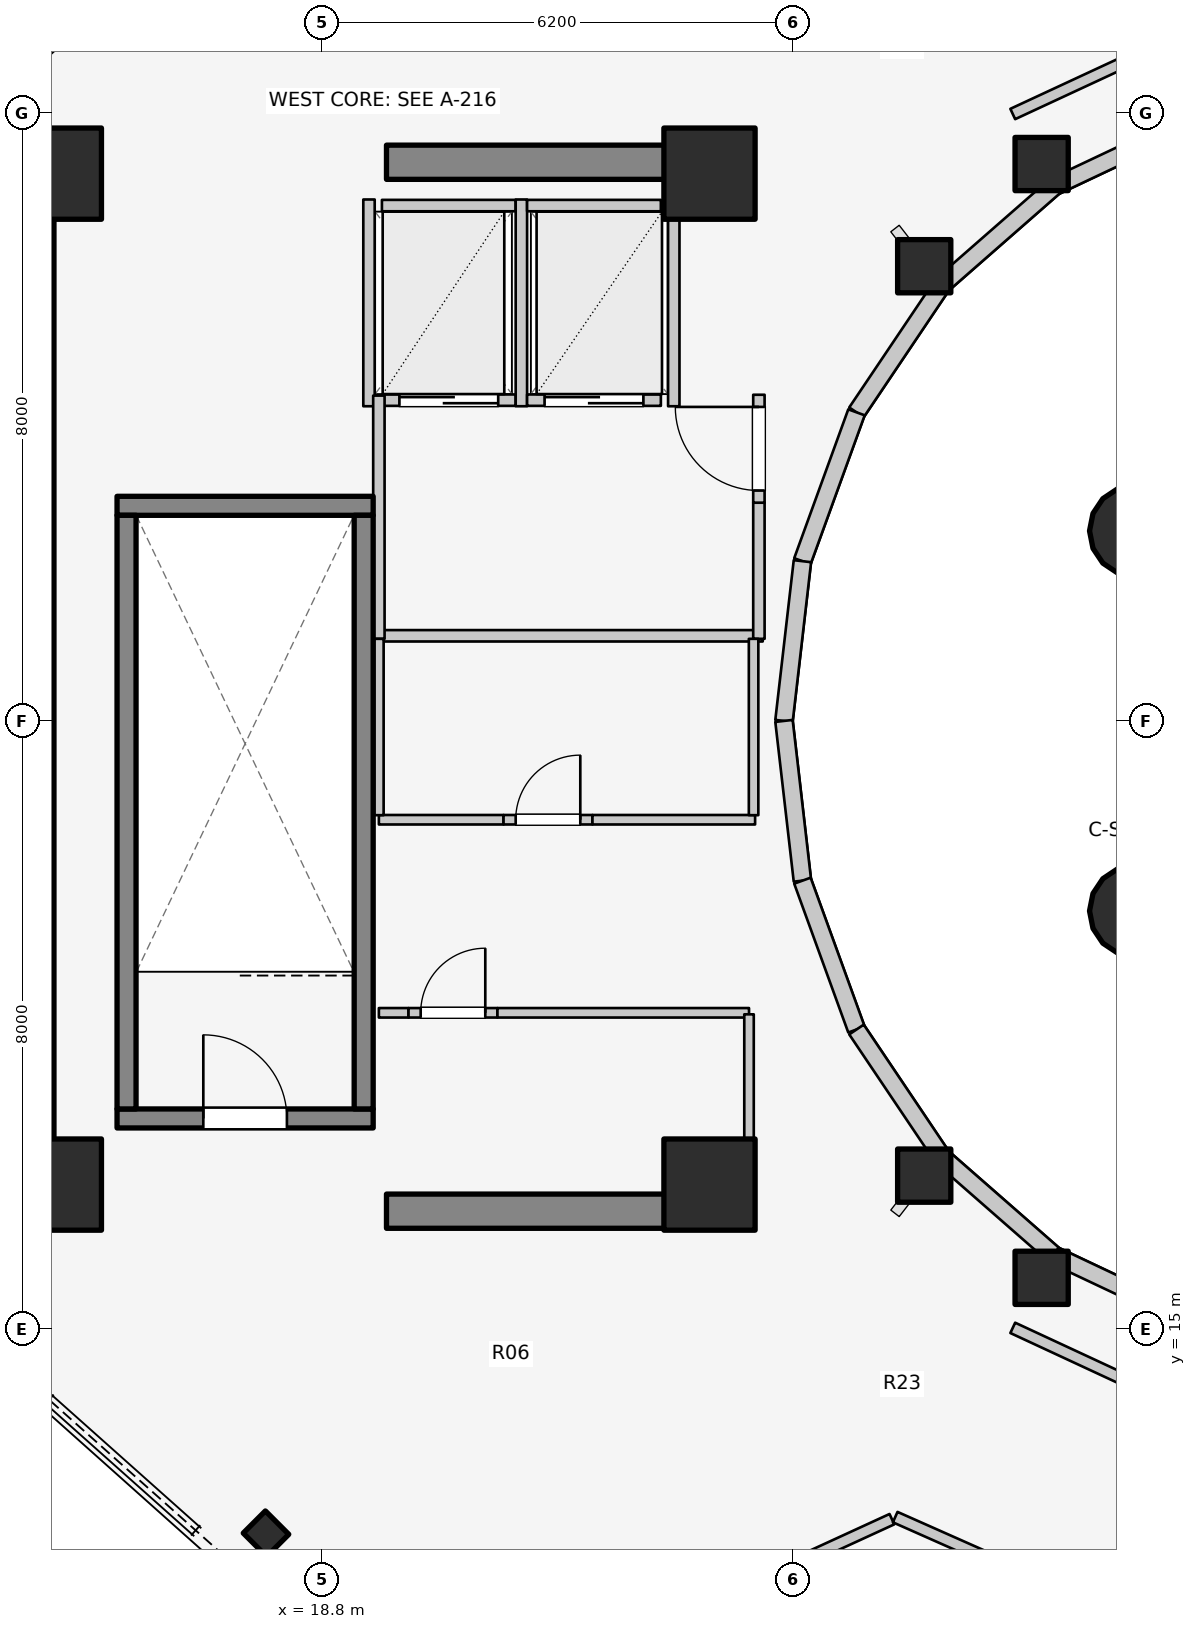
"""IFC4 building model, lengths in metres.
Left out: names, types, materials, properties, quantities, classifications, styles, units other than length and angle.
Written with IfcOpenShell. Run it as: python <this file> out.ifc"""

import sys

from ifc_helpers import new_model, si_unit, direction, frame, frame_2d, origin, origin_2d, place, context, subcontext, project, spatial, rectangle, hollow_circle, i_section, extrude, element, fill, save


model = new_model("IFC4")
c1 = context("Model", 3, precision=1e-05, world=origin(), true_north=direction((0.0, 1.0)))
c2 = subcontext(c1, "Body", "Model", "MODEL_VIEW")
j1 = project(units=[si_unit("LENGTHUNIT", "METRE"), si_unit("PLANEANGLEUNIT", "RADIAN")], contexts=[c1])
p1 = place(None, origin())
s1 = spatial("IfcSite", under=j1, at=p1, CompositionType="ELEMENT")
p2 = place(p1, origin())
s2 = spatial("IfcBuilding", under=s1, at=p2, CompositionType="ELEMENT")
p3 = place(p2, frame((0.0, 0.0, 276.4)))
s3 = spatial("IfcBuildingStorey", under=s2, at=p3, CompositionType="ELEMENT", Elevation=276.4)
p4 = place(p3, frame((15.05, 17.05, 0.0), z_axis=(0.0, 0.0, 1.0), x_axis=(0.0, 1.0, 0.0)))
e1 = element("IfcWall", 1, at=p4, inside=s3, PredefinedType="SHEAR", context=c2, shape_type="SweptSolid", body=[
    extrude(rectangle(XDim=12.8, YDim=0.45, at=frame_2d((6.4, 0.0))), origin(), (0.0, 0.0, 1.0), 3.2),
])
for number, where, z_axis, x_axis in (
    (2, (19.65, 16.55, 0.0), (0.0, 0.0, 1.0), (1.0, 0.0, 0.0)),
    (3, (19.65, 30.35, 0.0), (0.0, 0.0, 1.0), (1.0, 0.0, 0.0)),
):
    element("IfcWall", number, at=place(p3, frame(where, z_axis=z_axis, x_axis=x_axis)), inside=s3, PredefinedType="SHEAR", context=c2, shape_type="SweptSolid", body=[
        extrude(rectangle(XDim=4.5, YDim=0.45, at=frame_2d((2.25, 0.0))), origin(), (0.0, 0.0, 1.0), 3.2),
    ])
p5 = place(p3, frame((16.105, 17.77, 0.0), z_axis=(0.0, 0.0, 1.0), x_axis=(1.0, 0.0, 0.0)))
e4 = element("IfcWall", 4, at=p5, inside=s3, PredefinedType="SOLIDWALL", context=c2, shape_type="SweptSolid", body=[
    extrude(rectangle(XDim=3.37, YDim=0.25, at=frame_2d((1.685, 0.0))), origin(), (0.0, 0.0, 1.0), 3.2),
])
p6 = place(p5, frame((1.135, 0.0, 0.0)))
e5 = element("IfcOpeningElement", 5, at=p6, cuts=e4, PredefinedType="OPENING", context=c2, shape_type="SweptSolid", body=[
    extrude(rectangle(XDim=1.1, YDim=2.1, at=frame_2d((0.55, 1.05))), frame((0.0, 0.135, 0.0), z_axis=(0.0, -1.0, 0.0), x_axis=(1.0, 0.0, 0.0)), (0.0, 0.0, 1.0), 0.27),
])
p7 = place(p3, frame((16.105, 25.83, 0.0), z_axis=(0.0, 0.0, 1.0), x_axis=(1.0, 0.0, 0.0)))
e6 = element("IfcWall", 6, at=p7, inside=s3, PredefinedType="SOLIDWALL", context=c2, shape_type="SweptSolid", body=[
    extrude(rectangle(XDim=3.37, YDim=0.25, at=frame_2d((1.685, 0.0))), origin(), (0.0, 0.0, 1.0), 3.2),
])
for number, where, z_axis, x_axis in (
    (7, (16.23, 17.895, 0.0), (0.0, 0.0, 1.0), (0.0, 1.0, 0.0)),
    (8, (19.35, 17.895, 0.0), (0.0, 0.0, 1.0), (0.0, 1.0, 0.0)),
):
    element("IfcWall", number, at=place(p3, frame(where, z_axis=z_axis, x_axis=x_axis)), inside=s3, PredefinedType="SOLIDWALL", context=c2, shape_type="SweptSolid", body=[
        extrude(rectangle(XDim=7.81, YDim=0.25, at=frame_2d((3.905, 0.0))), origin(), (0.0, 0.0, 1.0), 3.2),
    ])
for number, where, z_axis, x_axis in (
    (9, (15.3, 16.9, 0.0), (0.0, 0.0, 1.0), (1.0, 0.0, 0.0)),
    (10, (23.9, 16.9, 0.0), (0.0, 0.0, 1.0), (1.0, 0.0, 0.0)),
    (11, (23.9, 30.2, 0.0), (0.0, 0.0, 1.0), (1.0, 0.0, 0.0)),
    (12, (15.3, 30.2, 0.0), (0.0, 0.0, 1.0), (1.0, 0.0, 0.0)),
):
    element("IfcColumn", number, at=place(p3, frame(where, z_axis=z_axis, x_axis=x_axis)), inside=s3, PredefinedType="COLUMN", context=c2, shape_type="SweptSolid", body=[
        extrude(rectangle(XDim=1.2, YDim=1.2, at=origin_2d()), origin(), (0.0, 0.0, 1.0), 3.2),
    ])
for number, where, z_axis, x_axis in (
    (13, (28.27, 30.327, 0.0), (0.0, 0.0, 1.0), (1.0, 0.0, 0.0)),
    (14, (26.725, 28.982, 0.0), (0.0, 0.0, 1.0), (1.0, 0.0, 0.0)),
    (15, (26.725, 17.018, 0.0), (0.0, 0.0, 1.0), (1.0, 0.0, 0.0)),
):
    element("IfcColumn", number, at=place(p3, frame(where, z_axis=z_axis, x_axis=x_axis)), inside=s3, PredefinedType="COLUMN", context=c2, shape_type="SweptSolid", body=[
        extrude(rectangle(XDim=0.7, YDim=0.7, at=origin_2d()), origin(), (0.0, 0.0, 1.0), 3.2),
    ])
p8 = place(p3, frame((18.065, 12.307, 0.0), z_axis=(0.0, 0.0, 1.0), x_axis=(-0.707106781187, -0.707106781187, 0.0)))
e16 = element("IfcColumn", 16, at=p8, inside=s3, PredefinedType="COLUMN", context=c2, shape_type="SweptSolid", body=[
    extrude(i_section(OverallWidth=0.412, OverallDepth=0.435, WebThickness=0.036, FlangeThickness=0.057, FilletRadius=0.025, at=origin_2d()), origin(), (0.0, 0.0, 1.0), 3.2),
])
p9 = place(p3, frame((28.27, 15.673, 0.0), z_axis=(0.0, 0.0, 1.0), x_axis=(1.0, 0.0, 0.0)))
e17 = element("IfcColumn", 17, at=p9, inside=s3, PredefinedType="COLUMN", context=c2, shape_type="SweptSolid", body=[
    extrude(rectangle(XDim=0.7, YDim=0.7, at=origin_2d()), origin(), (0.0, 0.0, 1.0), 3.2),
])
for number, where, z_axis, x_axis in (
    (18, (29.5, 20.5, 0.0), (0.0, 0.0, 1.0), (1.0, 0.0, 0.0)),
    (19, (29.5, 25.5, 0.0), (0.0, 0.0, 1.0), (1.0, 0.0, 0.0)),
):
    element("IfcColumn", number, at=place(p3, frame(where, z_axis=z_axis, x_axis=x_axis)), inside=s3, PredefinedType="PILASTER", context=c2, shape_type="SweptSolid", body=[
        extrude(hollow_circle(Radius=0.6, WallThickness=0.032, at=origin_2d()), origin(), (0.0, 0.0, 1.0), 3.2),
    ])
p10 = place(p3, frame((30.157, 30.843, 0.0), z_axis=(0.0, 0.0, 1.0), x_axis=(-0.904179699603, -0.427152280606, 0.0)))
e20 = element("IfcWall", 20, at=p10, inside=s3, PredefinedType="STANDARD", context=c2, shape_type="SweptSolid", body=[
    extrude(rectangle(XDim=1.899, YDim=0.23, at=frame_2d((0.95, 0.0))), origin(), (0.0, 0.0, 1.0), 2.23),
])
p11 = place(p3, frame((28.44, 30.032, 0.0), z_axis=(0.0, 0.0, 1.0), x_axis=(-0.752576694707, -0.658504607869, 0.0)))
e21 = element("IfcWall", 21, at=p11, inside=s3, PredefinedType="STANDARD", context=c2, shape_type="SweptSolid", body=[
    extrude(rectangle(XDim=1.959, YDim=0.23, at=frame_2d((0.98, 0.0))), origin(), (0.0, 0.0, 1.0), 2.23),
])
p12 = place(p3, frame((26.965, 28.742, 0.0), z_axis=(0.0, 0.0, 1.0), x_axis=(-0.558197800898, -0.829707909492, 0.0)))
e22 = element("IfcWall", 22, at=p12, inside=s3, PredefinedType="STANDARD", context=c2, shape_type="SweptSolid", body=[
    extrude(rectangle(XDim=2.027, YDim=0.23, at=frame_2d((1.013, 0.0))), origin(), (0.0, 0.0, 1.0), 2.23),
])
p13 = place(p3, frame((25.834, 27.06, 0.0), z_axis=(0.0, 0.0, 1.0), x_axis=(-0.341423187295, -0.93990968033, 0.0)))
e23 = element("IfcWall", 23, at=p13, inside=s3, PredefinedType="STANDARD", context=c2, shape_type="SweptSolid", body=[
    extrude(rectangle(XDim=2.084, YDim=0.23, at=frame_2d((1.042, 0.0))), origin(), (0.0, 0.0, 1.0), 2.91),
])
for number, where, z_axis, x_axis in (
    (24, (25.123, 25.102, 0.0), (0.0, 0.0, 1.0), (-0.115, -0.993, 0.0)),
    (25, (24.88, 23.0, 0.0), (0.0, 0.0, 1.0), (0.115, -0.993, 0.0)),
):
    element("IfcWall", number, at=place(p3, frame(where, z_axis=z_axis, x_axis=x_axis)), inside=s3, PredefinedType="STANDARD", context=c2, shape_type="SweptSolid", body=[
        extrude(rectangle(XDim=2.115, YDim=0.23, at=frame_2d((1.058, 0.0))), origin(), (0.0, 0.0, 1.0), 2.91),
    ])
p14 = place(p3, frame((25.123, 20.898, 0.0), z_axis=(0.0, 0.0, 1.0), x_axis=(0.341423187295, -0.93990968033, 0.0)))
e26 = element("IfcWall", 26, at=p14, inside=s3, PredefinedType="STANDARD", context=c2, shape_type="SweptSolid", body=[
    extrude(rectangle(XDim=2.084, YDim=0.23, at=frame_2d((1.042, 0.0))), origin(), (0.0, 0.0, 1.0), 2.91),
])
p15 = place(p3, frame((25.834, 18.94, 0.0), z_axis=(0.0, 0.0, 1.0), x_axis=(0.558197800898, -0.829707909492, 0.0)))
e27 = element("IfcWall", 27, at=p15, inside=s3, PredefinedType="STANDARD", context=c2, shape_type="SweptSolid", body=[
    extrude(rectangle(XDim=2.027, YDim=0.23, at=frame_2d((1.013, 0.0))), origin(), (0.0, 0.0, 1.0), 2.23),
])
p16 = place(p3, frame((26.965, 17.258, 0.0), z_axis=(0.0, 0.0, 1.0), x_axis=(0.752576694707, -0.658504607869, 0.0)))
e28 = element("IfcWall", 28, at=p16, inside=s3, PredefinedType="STANDARD", context=c2, shape_type="SweptSolid", body=[
    extrude(rectangle(XDim=1.959, YDim=0.23, at=frame_2d((0.98, 0.0))), origin(), (0.0, 0.0, 1.0), 2.23),
])
p17 = place(p3, frame((28.44, 15.968, 0.0), z_axis=(0.0, 0.0, 1.0), x_axis=(0.904179699603, -0.427152280606, 0.0)))
e29 = element("IfcWall", 29, at=p17, inside=s3, PredefinedType="STANDARD", context=c2, shape_type="SweptSolid", body=[
    extrude(rectangle(XDim=1.899, YDim=0.23, at=frame_2d((0.95, 0.0))), origin(), (0.0, 0.0, 1.0), 2.23),
])
p18 = place(p3, frame((17.652, 34.106, 0.0), z_axis=(0.0, 0.0, 1.0), x_axis=(-0.746567900399, -0.665309228926, 0.0)))
e30 = element("IfcWall", 30, at=p18, inside=s3, PredefinedType="STANDARD", context=c2, shape_type="SweptSolid", body=[
    extrude(rectangle(XDim=3.957, YDim=0.26, at=frame_2d((1.979, 0.0))), origin(), (0.0, 0.0, 1.0), 2.95),
])
p19 = place(p3, frame((19.59, 27.22, 0.0), z_axis=(0.0, 0.0, 1.0), x_axis=(1.0, 0.0, 0.0)))
e31 = element("IfcWall", 31, at=p19, inside=s3, PredefinedType="SOLIDWALL", context=c2, shape_type="SweptSolid", body=[
    extrude(rectangle(XDim=1.76, YDim=0.15, at=frame_2d((0.88, 0.0))), origin(), (0.0, 0.0, 1.0), 2.925),
])
p20 = place(p19, frame((0.23, 0.0, 0.0)))
e32 = element("IfcOpeningElement", 32, at=p20, cuts=e31, PredefinedType="OPENING", context=c2, shape_type="SweptSolid", body=[
    extrude(rectangle(XDim=1.3, YDim=2.1, at=frame_2d((0.65, 1.05))), frame((0.0, 0.085, 0.0), z_axis=(0.0, -1.0, 0.0), x_axis=(1.0, 0.0, 0.0)), (0.0, 0.0, 1.0), 0.17),
])
p21 = place(p3, frame((19.59, 29.78, 0.0), z_axis=(0.0, 0.0, 1.0), x_axis=(1.0, 0.0, 0.0)))
e33 = element("IfcWall", 33, at=p21, inside=s3, PredefinedType="SOLIDWALL", context=c2, shape_type="SweptSolid", body=[
    extrude(rectangle(XDim=1.76, YDim=0.15, at=frame_2d((0.88, 0.0))), origin(), (0.0, 0.0, 1.0), 2.925),
])
for number, where, z_axis, x_axis in (
    (34, (19.42, 27.14, 0.0), (0.0, 0.0, 1.0), (0.0, 1.0, 0.0)),
    (35, (21.425, 27.14, 0.0), (0.0, 0.0, 1.0), (0.0, 1.0, 0.0)),
):
    element("IfcWall", number, at=place(p3, frame(where, z_axis=z_axis, x_axis=x_axis)), inside=s3, PredefinedType="SOLIDWALL", context=c2, shape_type="SweptSolid", body=[
        extrude(rectangle(XDim=2.72, YDim=0.15, at=frame_2d((1.36, 0.0))), origin(), (0.0, 0.0, 1.0), 2.925),
    ])
p22 = place(p3, frame((21.5, 27.22, 0.0), z_axis=(0.0, 0.0, 1.0), x_axis=(1.0, 0.0, 0.0)))
e36 = element("IfcWall", 36, at=p22, inside=s3, PredefinedType="SOLIDWALL", context=c2, shape_type="SweptSolid", body=[
    extrude(rectangle(XDim=1.76, YDim=0.15, at=frame_2d((0.88, 0.0))), origin(), (0.0, 0.0, 1.0), 2.925),
])
p23 = place(p22, frame((0.23, 0.0, 0.0)))
e37 = element("IfcOpeningElement", 37, at=p23, cuts=e36, PredefinedType="OPENING", context=c2, shape_type="SweptSolid", body=[
    extrude(rectangle(XDim=1.3, YDim=2.1, at=frame_2d((0.65, 1.05))), frame((0.0, 0.085, 0.0), z_axis=(0.0, -1.0, 0.0), x_axis=(1.0, 0.0, 0.0)), (0.0, 0.0, 1.0), 0.17),
])
p24 = place(p3, frame((21.5, 29.78, 0.0), z_axis=(0.0, 0.0, 1.0), x_axis=(1.0, 0.0, 0.0)))
e38 = element("IfcWall", 38, at=p24, inside=s3, PredefinedType="SOLIDWALL", context=c2, shape_type="SweptSolid", body=[
    extrude(rectangle(XDim=1.76, YDim=0.15, at=frame_2d((0.88, 0.0))), origin(), (0.0, 0.0, 1.0), 2.925),
])
p25 = place(p3, frame((23.43, 27.14, 0.0), z_axis=(0.0, 0.0, 1.0), x_axis=(0.0, 1.0, 0.0)))
e39 = element("IfcWall", 39, at=p25, inside=s3, PredefinedType="SOLIDWALL", context=c2, shape_type="SweptSolid", body=[
    extrude(rectangle(XDim=2.72, YDim=0.15, at=frame_2d((1.36, 0.0))), origin(), (0.0, 0.0, 1.0), 1.57),
])
p26 = place(p3, frame((19.52, 24.12, 0.0), z_axis=(0.0, 0.0, 1.0), x_axis=(1.0, 0.0, 0.0)))
e40 = element("IfcWall", 40, at=p26, inside=s3, PredefinedType="PARTITIONING", context=c2, shape_type="SweptSolid", body=[
    extrude(rectangle(XDim=5.08, YDim=0.15, at=frame_2d((2.54, 0.0))), origin(), (0.0, 0.0, 1.0), 1.57),
])
p27 = place(p3, frame((19.55, 24.08, 0.0), z_axis=(0.0, 0.0, 1.0), x_axis=(0.0, 1.0, 0.0)))
e41 = element("IfcWall", 41, at=p27, inside=s3, PredefinedType="PARTITIONING", context=c2, shape_type="SweptSolid", body=[
    extrude(rectangle(XDim=3.2, YDim=0.15, at=frame_2d((1.6, 0.0))), origin(), (0.0, 0.0, 1.0), 2.925),
])
p28 = place(p3, frame((24.55, 24.08, 0.0), z_axis=(0.0, 0.0, 1.0), x_axis=(0.0, 1.0, 0.0)))
e42 = element("IfcWall", 42, at=p28, inside=s3, PredefinedType="PARTITIONING", context=c2, shape_type="SweptSolid", body=[
    extrude(rectangle(XDim=1.791, YDim=0.15, at=frame_2d((0.896, 0.0))), origin(), (0.0, 0.0, 1.0), 1.57),
])
p29 = place(p3, frame((24.55, 25.871, 0.0), z_axis=(0.0, 0.0, 1.0), x_axis=(0.0, 1.0, 0.0)))
e43 = element("IfcWall", 43, at=p29, inside=s3, PredefinedType="PARTITIONING", context=c2, shape_type="SweptSolid", body=[
    extrude(rectangle(XDim=1.42, YDim=0.15, at=frame_2d((0.71, 0.0))), origin(), (0.0, 0.0, 1.0), 2.16),
])
p30 = place(p29, frame((0.16, 0.0, 0.0)))
e44 = element("IfcOpeningElement", 44, at=p30, cuts=e43, PredefinedType="OPENING", context=c2, shape_type="SweptSolid", body=[
    extrude(rectangle(XDim=1.1, YDim=2.1, at=frame_2d((0.55, 1.05))), frame((0.0, 0.085, 0.0), z_axis=(0.0, -1.0, 0.0), x_axis=(1.0, 0.0, 0.0)), (0.0, 0.0, 1.0), 0.17),
])
p31 = place(p3, frame((19.55, 19.16, 0.0), z_axis=(0.0, 0.0, 1.0), x_axis=(1.0, 0.0, 0.0)))
e45 = element("IfcWall", 45, at=p31, inside=s3, PredefinedType="PARTITIONING", context=c2, shape_type="SweptSolid", body=[
    extrude(rectangle(XDim=0.39, YDim=0.125, at=frame_2d((0.195, 0.0))), origin(), (0.0, 0.0, 1.0), 2.925),
])
p32 = place(p3, frame((19.94, 19.16, 0.0), z_axis=(0.0, 0.0, 1.0), x_axis=(1.0, 0.0, 0.0)))
e46 = element("IfcWall", 46, at=p32, inside=s3, PredefinedType="PARTITIONING", context=c2, shape_type="SweptSolid", body=[
    extrude(rectangle(XDim=1.17, YDim=0.125, at=frame_2d((0.585, 0.0))), origin(), (0.0, 0.0, 1.0), 2.925),
])
p33 = place(p32, frame((0.16, 0.0, 0.0)))
e47 = element("IfcOpeningElement", 47, at=p33, cuts=e46, PredefinedType="OPENING", context=c2, shape_type="SweptSolid", body=[
    extrude(rectangle(XDim=0.85, YDim=2.05, at=frame_2d((0.425, 1.025))), frame((0.0, 0.073, 0.0), z_axis=(0.0, -1.0, 0.0), x_axis=(1.0, 0.0, 0.0)), (0.0, 0.0, 1.0), 0.145),
])
p34 = place(p3, frame((21.11, 19.16, 0.0), z_axis=(0.0, 0.0, 1.0), x_axis=(1.0, 0.0, 0.0)))
e48 = element("IfcWall", 48, at=p34, inside=s3, PredefinedType="PARTITIONING", context=c2, shape_type="SweptSolid", body=[
    extrude(rectangle(XDim=3.31, YDim=0.125, at=frame_2d((1.655, 0.0))), origin(), (0.0, 0.0, 1.0), 1.57),
])
p35 = place(p3, frame((24.42, 17.1, 0.0), z_axis=(0.0, 0.0, 1.0), x_axis=(0.0, 1.0, 0.0)))
e49 = element("IfcWall", 49, at=p35, inside=s3, PredefinedType="PARTITIONING", context=c2, shape_type="SweptSolid", body=[
    extrude(rectangle(XDim=2.04, YDim=0.125, at=frame_2d((1.02, 0.0))), origin(), (0.0, 0.0, 1.0), 1.57),
])
p36 = place(p3, frame((19.55, 21.7, 0.0), z_axis=(0.0, 0.0, 1.0), x_axis=(1.0, 0.0, 0.0)))
e50 = element("IfcWall", 50, at=p36, inside=s3, PredefinedType="PARTITIONING", context=c2, shape_type="SweptSolid", body=[
    extrude(rectangle(XDim=1.64, YDim=0.125, at=frame_2d((0.82, 0.0))), origin(), (0.0, 0.0, 1.0), 2.925),
])
p37 = place(p3, frame((21.19, 21.7, 0.0), z_axis=(0.0, 0.0, 1.0), x_axis=(1.0, 0.0, 0.0)))
e51 = element("IfcWall", 51, at=p37, inside=s3, PredefinedType="PARTITIONING", context=c2, shape_type="SweptSolid", body=[
    extrude(rectangle(XDim=1.17, YDim=0.125, at=frame_2d((0.585, 0.0))), origin(), (0.0, 0.0, 1.0), 2.925),
])
p38 = place(p37, frame((0.16, 0.0, 0.0)))
e52 = element("IfcOpeningElement", 52, at=p38, cuts=e51, PredefinedType="OPENING", context=c2, shape_type="SweptSolid", body=[
    extrude(rectangle(XDim=0.85, YDim=2.05, at=frame_2d((0.425, 1.025))), frame((0.0, 0.073, 0.0), z_axis=(0.0, -1.0, 0.0), x_axis=(1.0, 0.0, 0.0)), (0.0, 0.0, 1.0), 0.145),
])
p39 = place(p3, frame((22.36, 21.7, 0.0), z_axis=(0.0, 0.0, 1.0), x_axis=(1.0, 0.0, 0.0)))
e53 = element("IfcWall", 53, at=p39, inside=s3, PredefinedType="PARTITIONING", context=c2, shape_type="SweptSolid", body=[
    extrude(rectangle(XDim=2.14, YDim=0.125, at=frame_2d((1.07, 0.0))), origin(), (0.0, 0.0, 1.0), 1.57),
])
p40 = place(p3, frame((19.55, 21.76, 0.0), z_axis=(0.0, 0.0, 1.0), x_axis=(0.0, 1.0, 0.0)))
e54 = element("IfcWall", 54, at=p40, inside=s3, PredefinedType="PARTITIONING", context=c2, shape_type="SweptSolid", body=[
    extrude(rectangle(XDim=2.32, YDim=0.125, at=frame_2d((1.16, 0.0))), origin(), (0.0, 0.0, 1.0), 2.925),
])
p41 = place(p3, frame((24.48, 21.76, 0.0), z_axis=(0.0, 0.0, 1.0), x_axis=(0.0, 1.0, 0.0)))
e55 = element("IfcWall", 55, at=p41, inside=s3, PredefinedType="PARTITIONING", context=c2, shape_type="SweptSolid", body=[
    extrude(rectangle(XDim=2.32, YDim=0.125, at=frame_2d((1.16, 0.0))), origin(), (0.0, 0.0, 1.0), 1.57),
])
for number, where, z_axis, x_axis in (
    (56, (29.873, 31.906, 0.0), (0.0, 0.0, 1.0), (-0.907, -0.421, 0.0)),
    (57, (27.89, 15.015, 0.0), (0.0, 0.0, 1.0), (0.907, -0.421, 0.0)),
):
    element("IfcWall", number, at=place(p3, frame(where, z_axis=z_axis, x_axis=x_axis)), inside=s3, PredefinedType="PARTITIONING", context=c2, shape_type="SweptSolid", body=[
        extrude(rectangle(XDim=2.186, YDim=0.15, at=frame_2d((1.093, 0.0))), origin(), (0.0, 0.0, 1.0), 2.501),
    ])
p42 = place(p3, frame((26.3, 12.498, 0.0), z_axis=(0.0, 0.0, 1.0), x_axis=(-0.908705087361, -0.417438695144, 0.0)))
e58 = element("IfcWall", 58, at=p42, inside=s3, PredefinedType="PARTITIONING", context=c2, shape_type="SweptSolid", body=[
    extrude(rectangle(XDim=5.317, YDim=0.15, at=frame_2d((2.659, 0.0))), origin(), (0.0, 0.0, 1.0), 2.455),
])
p43 = place(p3, frame((26.343, 12.525, 0.0), z_axis=(0.0, 0.0, 1.0), x_axis=(0.913989848226, -0.405737054432, 0.0)))
e59 = element("IfcWall", 59, at=p43, inside=s3, PredefinedType="PARTITIONING", context=c2, shape_type="SweptSolid", body=[
    extrude(rectangle(XDim=2.991, YDim=0.15, at=frame_2d((1.496, 0.0))), origin(), (0.0, 0.0, 1.0), 2.455),
])
p44 = place(p6, origin())
e60 = element("IfcDoor", 60, at=p44, inside=s3, OperationType="SINGLE_SWING_LEFT", PredefinedType="DOOR", context=c2, shape_type="SweptSolid", body=[
    extrude(rectangle(XDim=1.1, YDim=2.1, at=frame_2d((0.55, 1.05))), frame((0.0, 0.025, 0.0), z_axis=(0.0, -1.0, 0.0), x_axis=(1.0, 0.0, 0.0)), (0.0, 0.0, 1.0), 0.05),
])
fill(e5, e60)
p45 = place(p20, origin())
e61 = element("IfcDoor", 61, at=p45, inside=s3, OperationType="DOUBLE_DOOR_SLIDING", PredefinedType="DOOR", context=c2, shape_type="SweptSolid", body=[
    extrude(rectangle(XDim=1.3, YDim=2.1, at=frame_2d((0.65, 1.05))), frame((0.0, 0.025, 0.0), z_axis=(0.0, -1.0, 0.0), x_axis=(1.0, 0.0, 0.0)), (0.0, 0.0, 1.0), 0.05),
])
fill(e32, e61)
p46 = place(p23, origin())
e62 = element("IfcDoor", 62, at=p46, inside=s3, OperationType="DOUBLE_DOOR_SLIDING", PredefinedType="DOOR", context=c2, shape_type="SweptSolid", body=[
    extrude(rectangle(XDim=1.3, YDim=2.1, at=frame_2d((0.65, 1.05))), frame((0.0, 0.025, 0.0), z_axis=(0.0, -1.0, 0.0), x_axis=(1.0, 0.0, 0.0)), (0.0, 0.0, 1.0), 0.05),
])
fill(e37, e62)
p47 = place(p30, origin())
e63 = element("IfcDoor", 63, at=p47, inside=s3, OperationType="SINGLE_SWING_RIGHT", PredefinedType="DOOR", context=c2, shape_type="SweptSolid", body=[
    extrude(rectangle(XDim=1.1, YDim=2.1, at=frame_2d((0.55, 1.05))), frame((0.0, 0.025, 0.0), z_axis=(0.0, -1.0, 0.0), x_axis=(1.0, 0.0, 0.0)), (0.0, 0.0, 1.0), 0.05),
])
fill(e44, e63)
p48 = place(p33, origin())
e64 = element("IfcDoor", 64, at=p48, inside=s3, OperationType="SINGLE_SWING_RIGHT", PredefinedType="DOOR", context=c2, shape_type="SweptSolid", body=[
    extrude(rectangle(XDim=0.85, YDim=2.05, at=frame_2d((0.425, 1.025))), frame((0.0, 0.025, 0.0), z_axis=(0.0, -1.0, 0.0), x_axis=(1.0, 0.0, 0.0)), (0.0, 0.0, 1.0), 0.05),
])
fill(e47, e64)
p49 = place(p38, origin())
e65 = element("IfcDoor", 65, at=p49, inside=s3, OperationType="SINGLE_SWING_RIGHT", PredefinedType="DOOR", context=c2, shape_type="SweptSolid", body=[
    extrude(rectangle(XDim=0.85, YDim=2.05, at=frame_2d((0.425, 1.025))), frame((0.0, 0.025, 0.0), z_axis=(0.0, -1.0, 0.0), x_axis=(1.0, 0.0, 0.0)), (0.0, 0.0, 1.0), 0.05),
])
fill(e52, e65)
save(model, sys.argv[1])
